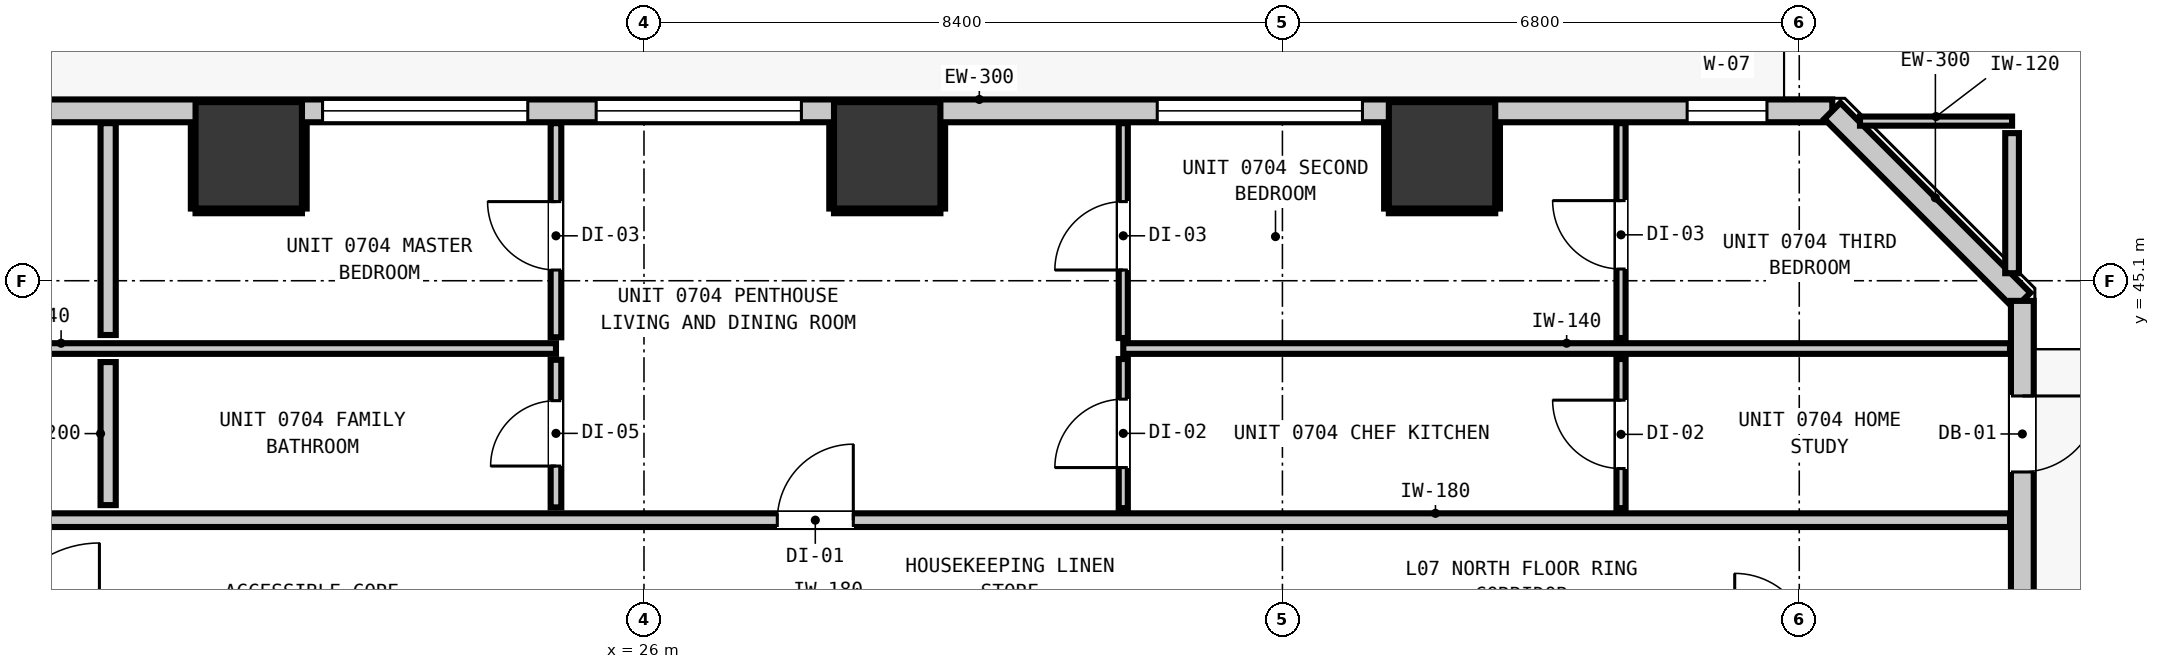
"""IFC4 building model, lengths in metres.
Left out: names, types, materials, properties, quantities, classifications, styles, units other than length and angle.
Written with IfcOpenShell. Run it as: python <this file> out.ifc"""

import sys

from ifc_helpers import new_model, si_unit, direction, frame, frame_2d, origin, origin_2d, place, context, subcontext, project, spatial, rectangle, extrude, element, fill, save


model = new_model("IFC4")
c1 = context("Model", 3, precision=1e-05, world=origin(), true_north=direction((0.0, 1.0)))
c2 = subcontext(c1, "Body", "Model", "MODEL_VIEW")
j1 = project(units=[si_unit("LENGTHUNIT", "METRE"), si_unit("PLANEANGLEUNIT", "RADIAN")], contexts=[c1])
p1 = place(None, origin())
s1 = spatial("IfcSite", under=j1, at=p1, CompositionType="ELEMENT")
p2 = place(p1, origin())
s2 = spatial("IfcBuilding", under=s1, at=p2, CompositionType="ELEMENT")
p3 = place(p2, frame((0.0, 0.0, 28.64)))
s3 = spatial("IfcBuildingStorey", under=s2, at=p3, CompositionType="ELEMENT", Elevation=28.64)
for number, where, z_axis, x_axis in (
    (1, (20.8, 46.75, 0.0), (0.0, 0.0, 1.0), (1.0, 0.0, 0.0)),
    (2, (29.2, 46.75, 0.0), (0.0, 0.0, 1.0), (1.0, 0.0, 0.0)),
    (3, (36.5, 46.75, 0.0), (0.0, 0.0, 1.0), (1.0, 0.0, 0.0)),
):
    element("IfcColumn", number, at=place(p3, frame(where, z_axis=z_axis, x_axis=x_axis)), inside=s3, PredefinedType="COLUMN", context=c2, shape_type="SweptSolid", body=[
        extrude(rectangle(XDim=1.4, YDim=1.4, at=origin_2d()), origin(), (0.0, 0.0, 1.0), 3.32),
    ])
p4 = place(p3, frame((4.165, 47.335, 0.0), z_axis=(0.0, 0.0, 1.0), x_axis=(1.0, 0.0, 0.0)))
e4 = element("IfcWall", 4, at=p4, inside=s3, PredefinedType="STANDARD", context=c2, shape_type="SweptSolid", body=[
    extrude(rectangle(XDim=37.47, YDim=0.3, at=frame_2d((18.735, 0.0))), origin(), (0.0, 0.0, 1.0), 3.06),
])
p5 = place(p4, frame((0.901, 0.0, 0.0)))
e5 = element("IfcOpeningElement", 5, at=p5, cuts=e4, PredefinedType="OPENING", context=c2, shape_type="SweptSolid", body=[
    extrude(rectangle(XDim=1.0, YDim=2.15, at=frame_2d((0.5, 1.075))), frame((0.0, 0.16, 0.0), z_axis=(0.0, -1.0, 0.0), x_axis=(1.0, 0.0, 0.0)), (0.0, 0.0, 1.0), 0.32),
])
p6 = place(p4, frame((3.893, 0.0, 0.85)))
e6 = element("IfcOpeningElement", 6, at=p6, cuts=e4, PredefinedType="OPENING", context=c2, shape_type="SweptSolid", body=[
    extrude(rectangle(XDim=2.7, YDim=2.0, at=frame_2d((1.35, 1.0))), frame((0.0, 0.16, 0.0), z_axis=(0.0, -1.0, 0.0), x_axis=(1.0, 0.0, 0.0)), (0.0, 0.0, 1.0), 0.32),
])
p7 = place(p4, frame((11.045, 0.0, 0.85)))
e7 = element("IfcOpeningElement", 7, at=p7, cuts=e4, PredefinedType="OPENING", context=c2, shape_type="SweptSolid", body=[
    extrude(rectangle(XDim=2.7, YDim=2.0, at=frame_2d((1.35, 1.0))), frame((0.0, 0.16, 0.0), z_axis=(0.0, -1.0, 0.0), x_axis=(1.0, 0.0, 0.0)), (0.0, 0.0, 1.0), 0.32),
])
p8 = place(p4, frame((21.206, 0.0, 0.85)))
e8 = element("IfcOpeningElement", 8, at=p8, cuts=e4, PredefinedType="OPENING", context=c2, shape_type="SweptSolid", body=[
    extrude(rectangle(XDim=2.7, YDim=2.0, at=frame_2d((1.35, 1.0))), frame((0.0, 0.16, 0.0), z_axis=(0.0, -1.0, 0.0), x_axis=(1.0, 0.0, 0.0)), (0.0, 0.0, 1.0), 0.32),
])
p9 = place(p4, frame((17.606, 0.0, 0.85)))
e9 = element("IfcOpeningElement", 9, at=p9, cuts=e4, PredefinedType="OPENING", context=c2, shape_type="SweptSolid", body=[
    extrude(rectangle(XDim=2.7, YDim=2.0, at=frame_2d((1.35, 1.0))), frame((0.0, 0.16, 0.0), z_axis=(0.0, -1.0, 0.0), x_axis=(1.0, 0.0, 0.0)), (0.0, 0.0, 1.0), 0.32),
])
p10 = place(p4, frame((28.588, 0.0, 0.85)))
e10 = element("IfcOpeningElement", 10, at=p10, cuts=e4, PredefinedType="OPENING", context=c2, shape_type="SweptSolid", body=[
    extrude(rectangle(XDim=2.7, YDim=2.0, at=frame_2d((1.35, 1.0))), frame((0.0, 0.16, 0.0), z_axis=(0.0, -1.0, 0.0), x_axis=(1.0, 0.0, 0.0)), (0.0, 0.0, 1.0), 0.32),
])
p11 = place(p4, frame((35.56, 0.0, 0.85)))
e11 = element("IfcOpeningElement", 11, at=p11, cuts=e4, PredefinedType="OPENING", context=c2, shape_type="SweptSolid", body=[
    extrude(rectangle(XDim=1.05, YDim=1.65, at=frame_2d((0.525, 0.825))), frame((0.0, 0.16, 0.0), z_axis=(0.0, -1.0, 0.0), x_axis=(1.0, 0.0, 0.0)), (0.0, 0.0, 1.0), 0.32),
])
p12 = place(p3, frame((41.635, 47.335, 0.0), z_axis=(0.0, 0.0, 1.0), x_axis=(0.707106781187, -0.707106781187, 0.0)))
e12 = element("IfcWall", 12, at=p12, inside=s3, PredefinedType="STANDARD", context=c2, shape_type="SweptSolid", body=[
    extrude(rectangle(XDim=3.536, YDim=0.3, at=frame_2d((1.768, 0.0))), origin(), (0.0, 0.0, 1.0), 3.06),
])
p13 = place(p3, frame((44.135, 44.835, 0.0), z_axis=(0.0, 0.0, 1.0), x_axis=(0.0, -1.0, 0.0)))
e13 = element("IfcWall", 13, at=p13, inside=s3, PredefinedType="STANDARD", context=c2, shape_type="SweptSolid", body=[
    extrude(rectangle(XDim=34.67, YDim=0.3, at=frame_2d((17.335, 0.0))), origin(), (0.0, 0.0, 1.0), 3.06),
])
p14 = place(p13, frame((1.251, 0.0, 0.0)))
e14 = element("IfcOpeningElement", 14, at=p14, cuts=e13, PredefinedType="OPENING", context=c2, shape_type="SweptSolid", body=[
    extrude(rectangle(XDim=1.0, YDim=2.15, at=frame_2d((0.5, 1.075))), frame((0.0, 0.16, 0.0), z_axis=(0.0, -1.0, 0.0), x_axis=(1.0, 0.0, 0.0)), (0.0, 0.0, 1.0), 0.32),
])
p15 = place(p13, frame((32.733, 0.0, 0.85)))
e15 = element("IfcOpeningElement", 15, at=p15, cuts=e13, PredefinedType="OPENING", context=c2, shape_type="SweptSolid", body=[
    extrude(rectangle(XDim=1.05, YDim=1.65, at=frame_2d((0.525, 0.825))), frame((0.0, 0.16, 0.0), z_axis=(0.0, -1.0, 0.0), x_axis=(1.0, 0.0, 0.0)), (0.0, 0.0, 1.0), 0.32),
])
p16 = place(p13, frame((17.135, 0.0, 0.85)))
e16 = element("IfcOpeningElement", 16, at=p16, cuts=e13, PredefinedType="OPENING", context=c2, shape_type="SweptSolid", body=[
    extrude(rectangle(XDim=2.7, YDim=2.0, at=frame_2d((1.35, 1.0))), frame((0.0, 0.16, 0.0), z_axis=(0.0, -1.0, 0.0), x_axis=(1.0, 0.0, 0.0)), (0.0, 0.0, 1.0), 0.32),
])
p17 = place(p13, frame((6.984, 0.0, 0.85)))
e17 = element("IfcOpeningElement", 17, at=p17, cuts=e13, PredefinedType="OPENING", context=c2, shape_type="SweptSolid", body=[
    extrude(rectangle(XDim=1.05, YDim=1.65, at=frame_2d((0.525, 0.825))), frame((0.0, 0.16, 0.0), z_axis=(0.0, -1.0, 0.0), x_axis=(1.0, 0.0, 0.0)), (0.0, 0.0, 1.0), 0.32),
])
p18 = place(p3, frame((12.989, 41.95, 0.0), z_axis=(0.0, 0.0, 1.0), x_axis=(1.0, 0.0, 0.0)))
e18 = element("IfcWall", 18, at=p18, inside=s3, PredefinedType="PARTITIONING", context=c2, shape_type="SweptSolid", body=[
    extrude(rectangle(XDim=30.984, YDim=0.18, at=frame_2d((15.492, 0.0))), origin(), (0.0, 0.0, 1.0), 3.06),
])
p19 = place(p18, frame((14.765, 0.0, 0.0)))
e19 = element("IfcOpeningElement", 19, at=p19, cuts=e18, PredefinedType="OPENING", context=c2, shape_type="SweptSolid", body=[
    extrude(rectangle(XDim=1.0, YDim=2.15, at=frame_2d((0.5, 1.075))), frame((0.0, 0.1, 0.0), z_axis=(0.0, -1.0, 0.0), x_axis=(1.0, 0.0, 0.0)), (0.0, 0.0, 1.0), 0.2),
])
p20 = place(p3, frame((11.82, 44.208, 0.0), z_axis=(0.0, 0.0, 1.0), x_axis=(1.0, 0.0, 0.0)))
e20 = element("IfcWall", 20, at=p20, inside=s3, PredefinedType="PARTITIONING", context=c2, shape_type="SweptSolid", body=[
    extrude(rectangle(XDim=13.022, YDim=0.14, at=frame_2d((6.511, 0.0))), origin(), (0.0, 0.0, 1.0), 3.06),
])
p21 = place(p3, frame((32.306, 44.208, 0.0), z_axis=(0.0, 0.0, 1.0), x_axis=(1.0, 0.0, 0.0)))
e21 = element("IfcWall", 21, at=p21, inside=s3, PredefinedType="PARTITIONING", context=c2, shape_type="SweptSolid", body=[
    extrude(rectangle(XDim=11.667, YDim=0.14, at=frame_2d((5.833, 0.0))), origin(), (0.0, 0.0, 1.0), 3.06),
])
p22 = place(p3, frame((41.999, 47.2, 0.0), z_axis=(0.0, 0.0, 1.0), x_axis=(1.0, 0.0, 0.0)))
e22 = element("IfcWall", 22, at=p22, inside=s3, PredefinedType="PARTITIONING", context=c2, shape_type="SweptSolid", body=[
    extrude(rectangle(XDim=2.001, YDim=0.12, at=frame_2d((1.0, 0.0))), origin(), (0.0, 0.0, 1.0), 3.06),
])
p23 = place(p3, frame((18.95, 42.148, 0.0), z_axis=(0.0, 0.0, 1.0), x_axis=(0.0, 1.0, 0.0)))
e23 = element("IfcWall", 23, at=p23, inside=s3, PredefinedType="PARTITIONING", context=c2, shape_type="SweptSolid", body=[
    extrude(rectangle(XDim=1.882, YDim=0.2, at=frame_2d((0.941, 0.0))), origin(), (0.0, 0.0, 1.0), 3.06),
])
p24 = place(p3, frame((18.95, 44.386, 0.0), z_axis=(0.0, 0.0, 1.0), x_axis=(0.0, 1.0, 0.0)))
e24 = element("IfcWall", 24, at=p24, inside=s3, PredefinedType="PARTITIONING", context=c2, shape_type="SweptSolid", body=[
    extrude(rectangle(XDim=2.787, YDim=0.2, at=frame_2d((1.394, 0.0))), origin(), (0.0, 0.0, 1.0), 3.06),
])
p25 = place(p3, frame((44.0, 45.199, 0.0), z_axis=(0.0, 0.0, 1.0), x_axis=(0.0, 1.0, 0.0)))
e25 = element("IfcWall", 25, at=p25, inside=s3, PredefinedType="PARTITIONING", context=c2, shape_type="SweptSolid", body=[
    extrude(rectangle(XDim=1.843, YDim=0.18, at=frame_2d((0.921, 0.0))), origin(), (0.0, 0.0, 1.0), 3.06),
])
p26 = place(p3, frame((24.842, 42.118, 0.0), z_axis=(0.0, 0.0, 1.0), x_axis=(0.0, 1.0, 0.0)))
e26 = element("IfcWall", 26, at=p26, inside=s3, PredefinedType="PARTITIONING", context=c2, shape_type="SweptSolid", body=[
    extrude(rectangle(XDim=1.942, YDim=0.14, at=frame_2d((0.971, 0.0))), origin(), (0.0, 0.0, 1.0), 3.06),
])
p27 = place(p26, frame((0.544, 0.0, 0.0)))
e27 = element("IfcOpeningElement", 27, at=p27, cuts=e26, PredefinedType="OPENING", context=c2, shape_type="SweptSolid", body=[
    extrude(rectangle(XDim=0.86, YDim=2.02, at=frame_2d((0.43, 1.01))), frame((0.0, 0.08, 0.0), z_axis=(0.0, -1.0, 0.0), x_axis=(1.0, 0.0, 0.0)), (0.0, 0.0, 1.0), 0.16),
])
p28 = place(p3, frame((24.842, 44.356, 0.0), z_axis=(0.0, 0.0, 1.0), x_axis=(0.0, 1.0, 0.0)))
e28 = element("IfcWall", 28, at=p28, inside=s3, PredefinedType="PARTITIONING", context=c2, shape_type="SweptSolid", body=[
    extrude(rectangle(XDim=2.817, YDim=0.14, at=frame_2d((1.409, 0.0))), origin(), (0.0, 0.0, 1.0), 3.06),
])
p29 = place(p28, frame((0.885, 0.0, 0.0)))
e29 = element("IfcOpeningElement", 29, at=p29, cuts=e28, PredefinedType="OPENING", context=c2, shape_type="SweptSolid", body=[
    extrude(rectangle(XDim=0.9, YDim=2.1, at=frame_2d((0.45, 1.05))), frame((0.0, 0.08, 0.0), z_axis=(0.0, -1.0, 0.0), x_axis=(1.0, 0.0, 0.0)), (0.0, 0.0, 1.0), 0.16),
])
p30 = place(p3, frame((32.306, 42.108, 0.0), z_axis=(0.0, 0.0, 1.0), x_axis=(0.0, 1.0, 0.0)))
e30 = element("IfcWall", 30, at=p30, inside=s3, PredefinedType="PARTITIONING", context=c2, shape_type="SweptSolid", body=[
    extrude(rectangle(XDim=1.962, YDim=0.12, at=frame_2d((0.981, 0.0))), origin(), (0.0, 0.0, 1.0), 3.06),
])
p31 = place(p30, frame((0.534, 0.0, 0.0)))
e31 = element("IfcOpeningElement", 31, at=p31, cuts=e30, PredefinedType="OPENING", context=c2, shape_type="SweptSolid", body=[
    extrude(rectangle(XDim=0.9, YDim=2.1, at=frame_2d((0.45, 1.05))), frame((0.0, 0.07, 0.0), z_axis=(0.0, -1.0, 0.0), x_axis=(1.0, 0.0, 0.0)), (0.0, 0.0, 1.0), 0.14),
])
p32 = place(p3, frame((32.306, 44.346, 0.0), z_axis=(0.0, 0.0, 1.0), x_axis=(0.0, 1.0, 0.0)))
e32 = element("IfcWall", 32, at=p32, inside=s3, PredefinedType="PARTITIONING", context=c2, shape_type="SweptSolid", body=[
    extrude(rectangle(XDim=2.827, YDim=0.12, at=frame_2d((1.414, 0.0))), origin(), (0.0, 0.0, 1.0), 3.06),
])
p33 = place(p32, frame((0.895, 0.0, 0.0)))
e33 = element("IfcOpeningElement", 33, at=p33, cuts=e32, PredefinedType="OPENING", context=c2, shape_type="SweptSolid", body=[
    extrude(rectangle(XDim=0.9, YDim=2.1, at=frame_2d((0.45, 1.05))), frame((0.0, 0.07, 0.0), z_axis=(0.0, -1.0, 0.0), x_axis=(1.0, 0.0, 0.0)), (0.0, 0.0, 1.0), 0.14),
])
p34 = place(p3, frame((38.855, 42.108, 0.0), z_axis=(0.0, 0.0, 1.0), x_axis=(0.0, 1.0, 0.0)))
e34 = element("IfcWall", 34, at=p34, inside=s3, PredefinedType="PARTITIONING", context=c2, shape_type="SweptSolid", body=[
    extrude(rectangle(XDim=1.962, YDim=0.12, at=frame_2d((0.981, 0.0))), origin(), (0.0, 0.0, 1.0), 3.06),
])
p35 = place(p34, frame((0.521, 0.0, 0.0)))
e35 = element("IfcOpeningElement", 35, at=p35, cuts=e34, PredefinedType="OPENING", context=c2, shape_type="SweptSolid", body=[
    extrude(rectangle(XDim=0.9, YDim=2.1, at=frame_2d((0.45, 1.05))), frame((0.0, 0.07, 0.0), z_axis=(0.0, -1.0, 0.0), x_axis=(1.0, 0.0, 0.0)), (0.0, 0.0, 1.0), 0.14),
])
p36 = place(p3, frame((38.855, 44.346, 0.0), z_axis=(0.0, 0.0, 1.0), x_axis=(0.0, 1.0, 0.0)))
e36 = element("IfcWall", 36, at=p36, inside=s3, PredefinedType="PARTITIONING", context=c2, shape_type="SweptSolid", body=[
    extrude(rectangle(XDim=2.827, YDim=0.12, at=frame_2d((1.414, 0.0))), origin(), (0.0, 0.0, 1.0), 3.06),
])
p37 = place(p36, frame((0.908, 0.0, 0.0)))
e37 = element("IfcOpeningElement", 37, at=p37, cuts=e36, PredefinedType="OPENING", context=c2, shape_type="SweptSolid", body=[
    extrude(rectangle(XDim=0.9, YDim=2.1, at=frame_2d((0.45, 1.05))), frame((0.0, 0.07, 0.0), z_axis=(0.0, -1.0, 0.0), x_axis=(1.0, 0.0, 0.0)), (0.0, 0.0, 1.0), 0.14),
])
p38 = place(p3, frame((20.1, 46.018, 0.0), z_axis=(0.0, 0.0, 1.0), x_axis=(1.0, 0.0, 0.0)))
e38 = element("IfcWall", 38, at=p38, inside=s3, PredefinedType="PARTITIONING", context=c2, shape_type="SweptSolid", body=[
    extrude(rectangle(XDim=1.4, YDim=0.06, at=frame_2d((0.7, 0.0))), origin(), (0.0, 0.0, 1.0), 1.45),
])
for number, where, z_axis, x_axis in (
    (39, (20.068, 46.05, 0.0), (0.0, 0.0, 1.0), (0.0, 1.0, 0.0)),
    (40, (21.532, 46.05, 0.0), (0.0, 0.0, 1.0), (0.0, 1.0, 0.0)),
):
    element("IfcWall", number, at=place(p3, frame(where, z_axis=z_axis, x_axis=x_axis)), inside=s3, PredefinedType="PARTITIONING", context=c2, shape_type="SweptSolid", body=[
        extrude(rectangle(XDim=1.12, YDim=0.06, at=frame_2d((0.56, 0.0))), origin(), (0.0, 0.0, 1.0), 1.45),
    ])
p39 = place(p3, frame((28.5, 46.018, 0.0), z_axis=(0.0, 0.0, 1.0), x_axis=(1.0, 0.0, 0.0)))
e41 = element("IfcWall", 41, at=p39, inside=s3, PredefinedType="PARTITIONING", context=c2, shape_type="SweptSolid", body=[
    extrude(rectangle(XDim=1.4, YDim=0.06, at=frame_2d((0.7, 0.0))), origin(), (0.0, 0.0, 1.0), 1.45),
])
for number, where, z_axis, x_axis in (
    (42, (28.468, 46.05, 0.0), (0.0, 0.0, 1.0), (0.0, 1.0, 0.0)),
    (43, (29.932, 46.05, 0.0), (0.0, 0.0, 1.0), (0.0, 1.0, 0.0)),
):
    element("IfcWall", number, at=place(p3, frame(where, z_axis=z_axis, x_axis=x_axis)), inside=s3, PredefinedType="PARTITIONING", context=c2, shape_type="SweptSolid", body=[
        extrude(rectangle(XDim=1.12, YDim=0.06, at=frame_2d((0.56, 0.0))), origin(), (0.0, 0.0, 1.0), 1.45),
    ])
p40 = place(p3, frame((35.8, 46.018, 0.0), z_axis=(0.0, 0.0, 1.0), x_axis=(1.0, 0.0, 0.0)))
e44 = element("IfcWall", 44, at=p40, inside=s3, PredefinedType="PARTITIONING", context=c2, shape_type="SweptSolid", body=[
    extrude(rectangle(XDim=1.4, YDim=0.06, at=frame_2d((0.7, 0.0))), origin(), (0.0, 0.0, 1.0), 1.45),
])
for number, where, z_axis, x_axis in (
    (45, (35.768, 46.05, 0.0), (0.0, 0.0, 1.0), (0.0, 1.0, 0.0)),
    (46, (37.232, 46.05, 0.0), (0.0, 0.0, 1.0), (0.0, 1.0, 0.0)),
):
    element("IfcWall", number, at=place(p3, frame(where, z_axis=z_axis, x_axis=x_axis)), inside=s3, PredefinedType="PARTITIONING", context=c2, shape_type="SweptSolid", body=[
        extrude(rectangle(XDim=1.12, YDim=0.06, at=frame_2d((0.56, 0.0))), origin(), (0.0, 0.0, 1.0), 1.45),
    ])
p41 = place(p14, origin())
e47 = element("IfcDoor", 47, at=p41, inside=s3, OperationType="SINGLE_SWING_LEFT", PredefinedType="DOOR", context=c2, shape_type="SweptSolid", body=[
    extrude(rectangle(XDim=1.0, YDim=2.15, at=frame_2d((0.5, 1.075))), frame((0.0, 0.025, 0.0), z_axis=(0.0, -1.0, 0.0), x_axis=(1.0, 0.0, 0.0)), (0.0, 0.0, 1.0), 0.05),
])
fill(e14, e47)
p42 = place(p8, origin())
e48 = element("IfcWindow", 48, at=p42, inside=s3, PartitioningType="SINGLE_PANEL", PredefinedType="WINDOW", context=c2, shape_type="SweptSolid", body=[
    extrude(rectangle(XDim=2.7, YDim=2.0, at=frame_2d((1.35, 1.0))), frame((0.0, 0.03, 0.0), z_axis=(0.0, -1.0, 0.0), x_axis=(1.0, 0.0, 0.0)), (0.0, 0.0, 1.0), 0.06),
])
fill(e8, e48)
p43 = place(p9, origin())
e49 = element("IfcWindow", 49, at=p43, inside=s3, PartitioningType="SINGLE_PANEL", PredefinedType="WINDOW", context=c2, shape_type="SweptSolid", body=[
    extrude(rectangle(XDim=2.7, YDim=2.0, at=frame_2d((1.35, 1.0))), frame((0.0, 0.03, 0.0), z_axis=(0.0, -1.0, 0.0), x_axis=(1.0, 0.0, 0.0)), (0.0, 0.0, 1.0), 0.06),
])
fill(e9, e49)
p44 = place(p10, origin())
e50 = element("IfcWindow", 50, at=p44, inside=s3, PartitioningType="SINGLE_PANEL", PredefinedType="WINDOW", context=c2, shape_type="SweptSolid", body=[
    extrude(rectangle(XDim=2.7, YDim=2.0, at=frame_2d((1.35, 1.0))), frame((0.0, 0.03, 0.0), z_axis=(0.0, -1.0, 0.0), x_axis=(1.0, 0.0, 0.0)), (0.0, 0.0, 1.0), 0.06),
])
fill(e10, e50)
p45 = place(p11, origin())
e51 = element("IfcWindow", 51, at=p45, inside=s3, PartitioningType="SINGLE_PANEL", PredefinedType="WINDOW", context=c2, shape_type="SweptSolid", body=[
    extrude(rectangle(XDim=1.05, YDim=1.65, at=frame_2d((0.525, 0.825))), frame((0.0, 0.03, 0.0), z_axis=(0.0, -1.0, 0.0), x_axis=(1.0, 0.0, 0.0)), (0.0, 0.0, 1.0), 0.06),
])
fill(e11, e51)
p46 = place(p19, origin())
e52 = element("IfcDoor", 52, at=p46, inside=s3, OperationType="SINGLE_SWING_RIGHT", PredefinedType="DOOR", context=c2, shape_type="SweptSolid", body=[
    extrude(rectangle(XDim=1.0, YDim=2.15, at=frame_2d((0.5, 1.075))), frame((0.0, 0.025, 0.0), z_axis=(0.0, -1.0, 0.0), x_axis=(1.0, 0.0, 0.0)), (0.0, 0.0, 1.0), 0.05),
])
fill(e19, e52)
p47 = place(p27, origin())
e53 = element("IfcDoor", 53, at=p47, inside=s3, OperationType="SINGLE_SWING_LEFT", PredefinedType="DOOR", context=c2, shape_type="SweptSolid", body=[
    extrude(rectangle(XDim=0.86, YDim=2.02, at=frame_2d((0.43, 1.01))), frame((0.0, 0.025, 0.0), z_axis=(0.0, -1.0, 0.0), x_axis=(1.0, 0.0, 0.0)), (0.0, 0.0, 1.0), 0.05),
])
fill(e27, e53)
p48 = place(p29, origin())
e54 = element("IfcDoor", 54, at=p48, inside=s3, OperationType="SINGLE_SWING_RIGHT", PredefinedType="DOOR", context=c2, shape_type="SweptSolid", body=[
    extrude(rectangle(XDim=0.9, YDim=2.1, at=frame_2d((0.45, 1.05))), frame((0.0, 0.025, 0.0), z_axis=(0.0, -1.0, 0.0), x_axis=(1.0, 0.0, 0.0)), (0.0, 0.0, 1.0), 0.05),
])
fill(e29, e54)
p49 = place(p31, origin())
e55 = element("IfcDoor", 55, at=p49, inside=s3, OperationType="SINGLE_SWING_LEFT", PredefinedType="DOOR", context=c2, shape_type="SweptSolid", body=[
    extrude(rectangle(XDim=0.9, YDim=2.1, at=frame_2d((0.45, 1.05))), frame((0.0, 0.025, 0.0), z_axis=(0.0, -1.0, 0.0), x_axis=(1.0, 0.0, 0.0)), (0.0, 0.0, 1.0), 0.05),
])
fill(e31, e55)
p50 = place(p35, origin())
e56 = element("IfcDoor", 56, at=p50, inside=s3, OperationType="SINGLE_SWING_RIGHT", PredefinedType="DOOR", context=c2, shape_type="SweptSolid", body=[
    extrude(rectangle(XDim=0.9, YDim=2.1, at=frame_2d((0.45, 1.05))), frame((0.0, 0.025, 0.0), z_axis=(0.0, -1.0, 0.0), x_axis=(1.0, 0.0, 0.0)), (0.0, 0.0, 1.0), 0.05),
])
fill(e35, e56)
p51 = place(p33, origin())
e57 = element("IfcDoor", 57, at=p51, inside=s3, OperationType="SINGLE_SWING_LEFT", PredefinedType="DOOR", context=c2, shape_type="SweptSolid", body=[
    extrude(rectangle(XDim=0.9, YDim=2.1, at=frame_2d((0.45, 1.05))), frame((0.0, 0.025, 0.0), z_axis=(0.0, -1.0, 0.0), x_axis=(1.0, 0.0, 0.0)), (0.0, 0.0, 1.0), 0.05),
])
fill(e33, e57)
p52 = place(p37, origin())
e58 = element("IfcDoor", 58, at=p52, inside=s3, OperationType="SINGLE_SWING_RIGHT", PredefinedType="DOOR", context=c2, shape_type="SweptSolid", body=[
    extrude(rectangle(XDim=0.9, YDim=2.1, at=frame_2d((0.45, 1.05))), frame((0.0, 0.025, 0.0), z_axis=(0.0, -1.0, 0.0), x_axis=(1.0, 0.0, 0.0)), (0.0, 0.0, 1.0), 0.05),
])
fill(e37, e58)
save(model, sys.argv[1])
